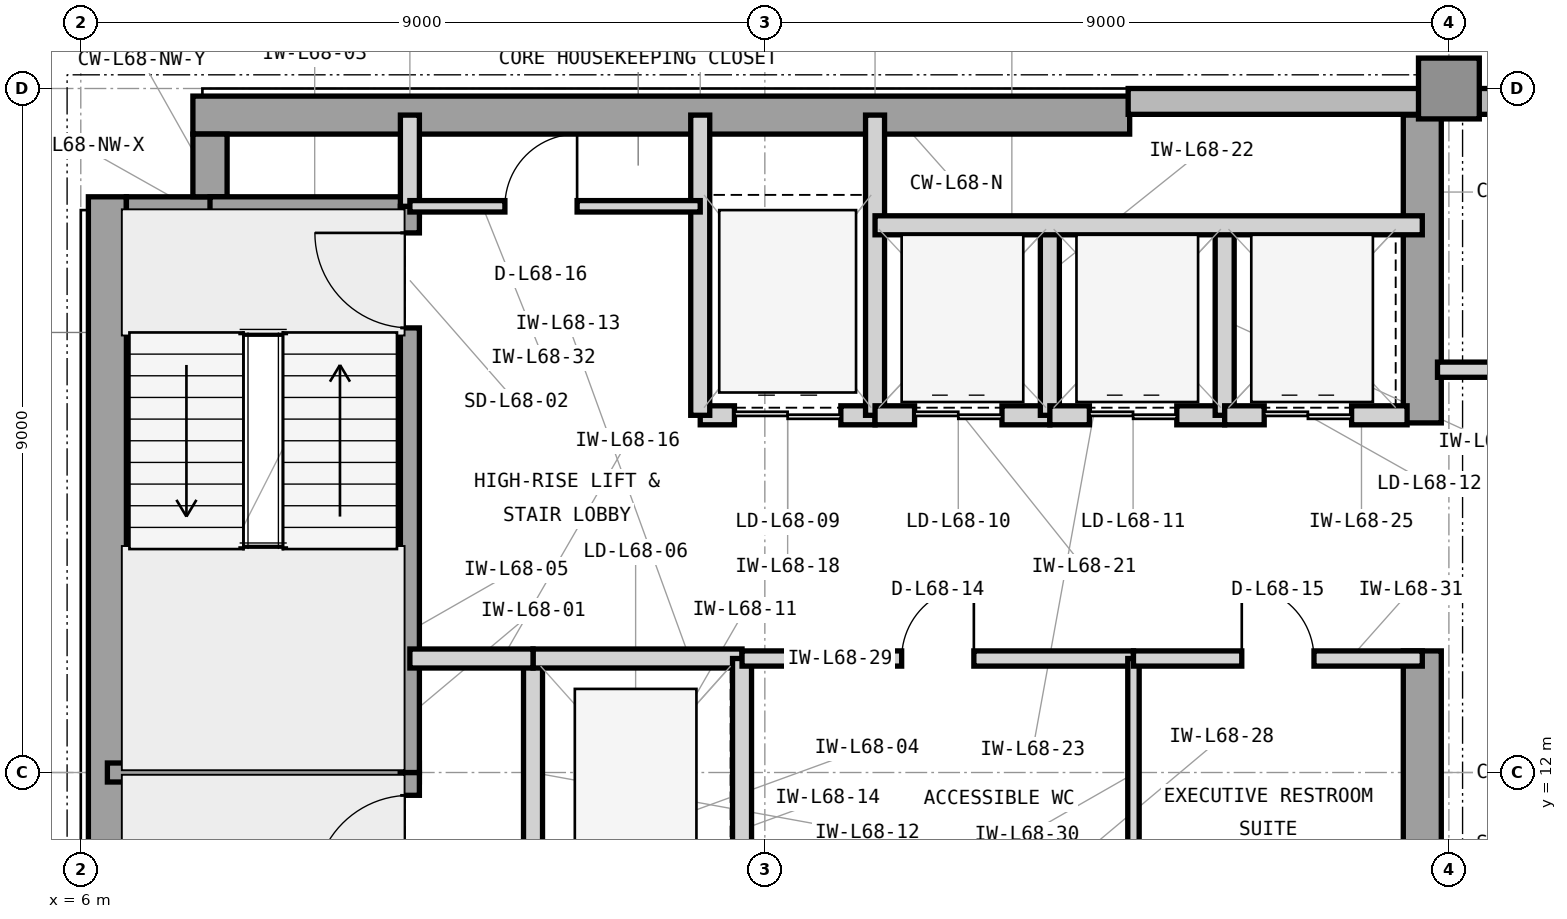
"""IFC4 building model, lengths in metres.
Left out: names, types, materials, properties, quantities, classifications, styles, units other than length and angle.
Written with IfcOpenShell. Run it as: python <this file> out.ifc"""

import sys

from ifc_helpers import new_model, si_unit, direction, frame, frame_2d, origin, origin_2d, place, context, subcontext, project, spatial, rectangle, extrude, element, fill, save


model = new_model("IFC4")
c1 = context("Model", 3, precision=1e-05, world=origin(), true_north=direction((0.0, 1.0)))
c2 = subcontext(c1, "Body", "Model", "MODEL_VIEW")
j1 = project(units=[si_unit("LENGTHUNIT", "METRE"), si_unit("PLANEANGLEUNIT", "RADIAN")], contexts=[c1])
p1 = place(None, origin())
s1 = spatial("IfcSite", under=j1, at=p1, CompositionType="ELEMENT")
p2 = place(p1, origin())
s2 = spatial("IfcBuilding", under=s1, at=p2, CompositionType="ELEMENT")
p3 = place(p2, frame((0.0, 0.0, 278.1)))
s3 = spatial("IfcBuildingStorey", under=s2, at=p3, CompositionType="ELEMENT", Elevation=278.1)
p4 = place(p3, frame((6.35, 4.425, 0.0), z_axis=(0.0, 0.0, 1.0), x_axis=(0.0, 1.0, 0.0)))
e1 = element("IfcWall", 1, at=p4, inside=s3, PredefinedType="SHEAR", context=c2, shape_type="SweptSolid", body=[
    extrude(rectangle(XDim=15.15, YDim=0.5, at=frame_2d((7.575, 0.0))), origin(), (0.0, 0.0, 1.0), 3.9),
])
p5 = place(p3, frame((7.475, 20.65, 0.0), z_axis=(0.0, 0.0, 1.0), x_axis=(1.0, 0.0, 0.0)))
e2 = element("IfcWall", 2, at=p5, inside=s3, PredefinedType="SHEAR", context=c2, shape_type="SweptSolid", body=[
    extrude(rectangle(XDim=12.325, YDim=0.5, at=frame_2d((6.163, 0.0))), origin(), (0.0, 0.0, 1.0), 3.9),
])
p6 = place(p3, frame((23.65, 10.4, 0.0), z_axis=(0.0, 0.0, 1.0), x_axis=(0.0, 1.0, 0.0)))
e3 = element("IfcWall", 3, at=p6, inside=s3, PredefinedType="SHEAR", context=c2, shape_type="SweptSolid", body=[
    extrude(rectangle(XDim=3.2, YDim=0.5, at=frame_2d((1.6, 0.0))), origin(), (0.0, 0.0, 1.0), 3.9),
])
p7 = place(p3, frame((23.65, 16.6, 0.0), z_axis=(0.0, 0.0, 1.0), x_axis=(0.0, 1.0, 0.0)))
e4 = element("IfcWall", 4, at=p7, inside=s3, PredefinedType="SHEAR", context=c2, shape_type="SweptSolid", body=[
    extrude(rectangle(XDim=4.05, YDim=0.5, at=frame_2d((2.025, 0.0))), origin(), (0.0, 0.0, 1.0), 3.9),
])
p8 = place(p3, frame((6.6, 19.35, 0.0), z_axis=(0.0, 0.0, 1.0), x_axis=(1.0, 0.0, 0.0)))
e5 = element("IfcWall", 5, at=p8, inside=s3, PredefinedType="SHEAR", context=c2, shape_type="SweptSolid", body=[
    extrude(rectangle(XDim=1.325, YDim=0.45, at=frame_2d((0.663, 0.0))), origin(), (0.0, 0.0, 1.0), 3.9),
])
p9 = place(p3, frame((7.7, 19.575, 0.0), z_axis=(0.0, 0.0, 1.0), x_axis=(0.0, 1.0, 0.0)))
e6 = element("IfcWall", 6, at=p9, inside=s3, PredefinedType="SHEAR", context=c2, shape_type="SweptSolid", body=[
    extrude(rectangle(XDim=0.825, YDim=0.45, at=frame_2d((0.413, 0.0))), origin(), (0.0, 0.0, 1.0), 3.9),
])
p10 = place(p3, frame((24.0, 21.0, 0.0), z_axis=(0.0, 0.0, 1.0), x_axis=(1.0, 0.0, 0.0)))
e7 = element("IfcColumn", 7, at=p10, inside=s3, PredefinedType="COLUMN", context=c2, shape_type="SweptSolid", body=[
    extrude(rectangle(XDim=0.8, YDim=0.8, at=origin_2d()), origin(), (0.0, 0.0, 1.0), 3.9),
])
p11 = place(p3, frame((52.4, 20.83, 0.0), z_axis=(0.0, 0.0, 1.0), x_axis=(-1.0, 0.0, 0.0)))
e8 = element("IfcWall", 8, at=p11, inside=s3, PredefinedType="STANDARD", context=c2, shape_type="SweptSolid", body=[
    extrude(rectangle(XDim=32.62, YDim=0.34, at=frame_2d((16.31, 0.0))), origin(), (0.0, 0.0, 1.0), 3.715),
])
p12 = place(p11, frame((15.01, 0.0, 0.8)))
e9 = element("IfcOpeningElement", 9, at=p12, cuts=e8, PredefinedType="OPENING", context=c2, shape_type="SweptSolid", body=[
    extrude(rectangle(XDim=2.6, YDim=2.35, at=frame_2d((1.3, 1.175))), frame((0.0, 0.18, 0.0), z_axis=(0.0, -1.0, 0.0), x_axis=(1.0, 0.0, 0.0)), (0.0, 0.0, 1.0), 0.36),
])
p13 = place(p11, frame((24.33, 0.0, 0.8)))
e10 = element("IfcOpeningElement", 10, at=p13, cuts=e8, PredefinedType="OPENING", context=c2, shape_type="SweptSolid", body=[
    extrude(rectangle(XDim=2.6, YDim=2.35, at=frame_2d((1.3, 1.175))), frame((0.0, 0.18, 0.0), z_axis=(0.0, -1.0, 0.0), x_axis=(1.0, 0.0, 0.0)), (0.0, 0.0, 1.0), 0.36),
])
p14 = place(p11, frame((7.525, 0.0, 0.8)))
e11 = element("IfcOpeningElement", 11, at=p14, cuts=e8, PredefinedType="OPENING", context=c2, shape_type="SweptSolid", body=[
    extrude(rectangle(XDim=1.9, YDim=2.35, at=frame_2d((0.95, 1.175))), frame((0.0, 0.18, 0.0), z_axis=(0.0, -1.0, 0.0), x_axis=(1.0, 0.0, 0.0)), (0.0, 0.0, 1.0), 0.36),
])
p15 = place(p3, frame((6.35, 12.0, 0.0), z_axis=(0.0, 0.0, 1.0), x_axis=(1.0, 0.0, 0.0)))
e12 = element("IfcWall", 12, at=p15, inside=s3, PredefinedType="SHEAR", context=c2, shape_type="SweptSolid", body=[
    extrude(rectangle(XDim=4.105, YDim=0.25, at=frame_2d((2.052, 0.0))), origin(), (0.0, 0.0, 1.0), 3.9),
])
p16 = place(p3, frame((7.7, 19.45, 0.0), z_axis=(0.0, 0.0, 1.0), x_axis=(1.0, 0.0, 0.0)))
e13 = element("IfcWall", 13, at=p16, inside=s3, PredefinedType="SHEAR", context=c2, shape_type="SweptSolid", body=[
    extrude(rectangle(XDim=2.755, YDim=0.25, at=frame_2d((1.377, 0.0))), origin(), (0.0, 0.0, 1.0), 3.9),
])
p17 = place(p3, frame((10.33, 4.55, 0.0), z_axis=(0.0, 0.0, 1.0), x_axis=(0.0, 1.0, 0.0)))
e14 = element("IfcWall", 14, at=p17, inside=s3, PredefinedType="SHEAR", context=c2, shape_type="SweptSolid", body=[
    extrude(rectangle(XDim=7.45, YDim=0.25, at=frame_2d((3.725, 0.0))), origin(), (0.0, 0.0, 1.0), 3.9),
])
p18 = place(p17, frame((5.9, 0.0, 0.0)))
e15 = element("IfcOpeningElement", 15, at=p18, cuts=e14, PredefinedType="OPENING", context=c2, shape_type="SweptSolid", body=[
    extrude(rectangle(XDim=1.25, YDim=2.2, at=frame_2d((0.625, 1.1))), frame((0.0, 0.135, 0.0), z_axis=(0.0, -1.0, 0.0), x_axis=(1.0, 0.0, 0.0)), (0.0, 0.0, 1.0), 0.27),
])
p19 = place(p3, frame((10.33, 12.0, 0.0), z_axis=(0.0, 0.0, 1.0), x_axis=(0.0, 1.0, 0.0)))
e16 = element("IfcWall", 16, at=p19, inside=s3, PredefinedType="SHEAR", context=c2, shape_type="SweptSolid", body=[
    extrude(rectangle(XDim=7.45, YDim=0.25, at=frame_2d((3.725, 0.0))), origin(), (0.0, 0.0, 1.0), 3.9),
])
p20 = place(p19, frame((5.85, 0.0, 0.0)))
e17 = element("IfcOpeningElement", 17, at=p20, cuts=e16, PredefinedType="OPENING", context=c2, shape_type="SweptSolid", body=[
    extrude(rectangle(XDim=1.25, YDim=2.2, at=frame_2d((0.625, 1.1))), frame((0.0, 0.135, 0.0), z_axis=(0.0, -1.0, 0.0), x_axis=(1.0, 0.0, 0.0)), (0.0, 0.0, 1.0), 0.27),
])
p21 = place(p3, frame((10.33, 19.45, 0.0), z_axis=(0.0, 0.0, 1.0), x_axis=(0.0, 1.0, 0.0)))
e18 = element("IfcWall", 18, at=p21, inside=s3, PredefinedType="PARTITIONING", context=c2, shape_type="SweptSolid", body=[
    extrude(rectangle(XDim=1.2, YDim=0.25, at=frame_2d((0.6, 0.0))), origin(), (0.0, 0.0, 1.0), 3.705),
])
p22 = place(p3, frame((11.95, 10.5, 0.0), z_axis=(0.0, 0.0, 1.0), x_axis=(0.0, 1.0, 0.0)))
e19 = element("IfcWall", 19, at=p22, inside=s3, PredefinedType="PARTITIONING", context=c2, shape_type="SweptSolid", body=[
    extrude(rectangle(XDim=3.0, YDim=0.25, at=frame_2d((1.5, 0.0))), origin(), (0.0, 0.0, 1.0), 3.705),
])
p23 = place(p3, frame((11.95, 13.5, 0.0), z_axis=(0.0, 0.0, 1.0), x_axis=(1.0, 0.0, 0.0)))
e20 = element("IfcWall", 20, at=p23, inside=s3, PredefinedType="PARTITIONING", context=c2, shape_type="SweptSolid", body=[
    extrude(rectangle(XDim=2.75, YDim=0.25, at=frame_2d((1.375, 0.0))), origin(), (0.0, 0.0, 1.0), 3.088),
])
p24 = place(p3, frame((14.7, 10.5, 0.0), z_axis=(0.0, 0.0, 1.0), x_axis=(0.0, 1.0, 0.0)))
e21 = element("IfcWall", 21, at=p24, inside=s3, PredefinedType="PARTITIONING", context=c2, shape_type="SweptSolid", body=[
    extrude(rectangle(XDim=3.0, YDim=0.25, at=frame_2d((1.5, 0.0))), origin(), (0.0, 0.0, 1.0), 3.705),
])
p25 = place(p3, frame((10.33, 13.5, 0.0), z_axis=(0.0, 0.0, 1.0), x_axis=(1.0, 0.0, 0.0)))
e22 = element("IfcWall", 22, at=p25, inside=s3, PredefinedType="PARTITIONING", context=c2, shape_type="SweptSolid", body=[
    extrude(rectangle(XDim=1.62, YDim=0.25, at=frame_2d((0.81, 0.0))), origin(), (0.0, 0.0, 1.0), 3.088),
])
p26 = place(p3, frame((14.15, 16.7, 0.0), z_axis=(0.0, 0.0, 1.0), x_axis=(1.0, 0.0, 0.0)))
e23 = element("IfcWall", 23, at=p26, inside=s3, PredefinedType="PARTITIONING", context=c2, shape_type="SweptSolid", body=[
    extrude(rectangle(XDim=2.3, YDim=0.25, at=frame_2d((1.15, 0.0))), origin(), (0.0, 0.0, 1.0), 3.088),
])
p27 = place(p26, frame((0.45, 0.0, 0.0)))
e24 = element("IfcOpeningElement", 24, at=p27, cuts=e23, PredefinedType="OPENING", context=c2, shape_type="SweptSolid", body=[
    extrude(rectangle(XDim=1.4, YDim=2.35, at=frame_2d((0.7, 1.175))), frame((0.0, 0.135, 0.0), z_axis=(0.0, -1.0, 0.0), x_axis=(1.0, 0.0, 0.0)), (0.0, 0.0, 1.0), 0.27),
])
for number, where, z_axis, x_axis in (
    (25, (14.15, 16.7, 0.0), (0.0, 0.0, 1.0), (0.0, 1.0, 0.0)),
    (26, (16.45, 16.7, 0.0), (0.0, 0.0, 1.0), (0.0, 1.0, 0.0)),
):
    element("IfcWall", number, at=place(p3, frame(where, z_axis=z_axis, x_axis=x_axis)), inside=s3, PredefinedType="PARTITIONING", context=c2, shape_type="SweptSolid", body=[
        extrude(rectangle(XDim=3.95, YDim=0.25, at=frame_2d((1.975, 0.0))), origin(), (0.0, 0.0, 1.0), 3.705),
    ])
p28 = place(p3, frame((16.45, 16.7, 0.0), z_axis=(0.0, 0.0, 1.0), x_axis=(1.0, 0.0, 0.0)))
e27 = element("IfcWall", 27, at=p28, inside=s3, PredefinedType="PARTITIONING", context=c2, shape_type="SweptSolid", body=[
    extrude(rectangle(XDim=2.3, YDim=0.25, at=frame_2d((1.15, 0.0))), origin(), (0.0, 0.0, 1.0), 3.088),
])
p29 = place(p28, frame((0.52, 0.0, 0.0)))
e28 = element("IfcOpeningElement", 28, at=p29, cuts=e27, PredefinedType="OPENING", context=c2, shape_type="SweptSolid", body=[
    extrude(rectangle(XDim=1.15, YDim=2.25, at=frame_2d((0.575, 1.125))), frame((0.0, 0.135, 0.0), z_axis=(0.0, -1.0, 0.0), x_axis=(1.0, 0.0, 0.0)), (0.0, 0.0, 1.0), 0.27),
])
p30 = place(p3, frame((18.75, 16.7, 0.0), z_axis=(0.0, 0.0, 1.0), x_axis=(0.0, 1.0, 0.0)))
e29 = element("IfcWall", 29, at=p30, inside=s3, PredefinedType="PARTITIONING", context=c2, shape_type="SweptSolid", body=[
    extrude(rectangle(XDim=2.5, YDim=0.25, at=frame_2d((1.25, 0.0))), origin(), (0.0, 0.0, 1.0), 3.705),
])
p31 = place(p3, frame((18.75, 16.7, 0.0), z_axis=(0.0, 0.0, 1.0), x_axis=(1.0, 0.0, 0.0)))
e30 = element("IfcWall", 30, at=p31, inside=s3, PredefinedType="PARTITIONING", context=c2, shape_type="SweptSolid", body=[
    extrude(rectangle(XDim=2.3, YDim=0.25, at=frame_2d((1.15, 0.0))), origin(), (0.0, 0.0, 1.0), 3.088),
])
p32 = place(p31, frame((0.52, 0.0, 0.0)))
e31 = element("IfcOpeningElement", 31, at=p32, cuts=e30, PredefinedType="OPENING", context=c2, shape_type="SweptSolid", body=[
    extrude(rectangle(XDim=1.15, YDim=2.25, at=frame_2d((0.575, 1.125))), frame((0.0, 0.135, 0.0), z_axis=(0.0, -1.0, 0.0), x_axis=(1.0, 0.0, 0.0)), (0.0, 0.0, 1.0), 0.27),
])
p33 = place(p3, frame((21.05, 16.7, 0.0), z_axis=(0.0, 0.0, 1.0), x_axis=(0.0, 1.0, 0.0)))
e32 = element("IfcWall", 32, at=p33, inside=s3, PredefinedType="PARTITIONING", context=c2, shape_type="SweptSolid", body=[
    extrude(rectangle(XDim=2.5, YDim=0.25, at=frame_2d((1.25, 0.0))), origin(), (0.0, 0.0, 1.0), 3.705),
])
p34 = place(p3, frame((21.05, 16.7, 0.0), z_axis=(0.0, 0.0, 1.0), x_axis=(1.0, 0.0, 0.0)))
e33 = element("IfcWall", 33, at=p34, inside=s3, PredefinedType="PARTITIONING", context=c2, shape_type="SweptSolid", body=[
    extrude(rectangle(XDim=2.4, YDim=0.25, at=frame_2d((1.2, 0.0))), origin(), (0.0, 0.0, 1.0), 3.088),
])
p35 = place(p34, frame((0.52, 0.0, 0.0)))
e34 = element("IfcOpeningElement", 34, at=p35, cuts=e33, PredefinedType="OPENING", context=c2, shape_type="SweptSolid", body=[
    extrude(rectangle(XDim=1.15, YDim=2.25, at=frame_2d((0.575, 1.125))), frame((0.0, 0.135, 0.0), z_axis=(0.0, -1.0, 0.0), x_axis=(1.0, 0.0, 0.0)), (0.0, 0.0, 1.0), 0.27),
])
p36 = place(p3, frame((16.45, 19.2, 0.0), z_axis=(0.0, 0.0, 1.0), x_axis=(1.0, 0.0, 0.0)))
e35 = element("IfcWall", 35, at=p36, inside=s3, PredefinedType="PARTITIONING", context=c2, shape_type="SweptSolid", body=[
    extrude(rectangle(XDim=7.2, YDim=0.25, at=frame_2d((3.6, 0.0))), origin(), (0.0, 0.0, 1.0), 3.705),
])
p37 = place(p3, frame((14.7, 13.5, 0.0), z_axis=(0.0, 0.0, 1.0), x_axis=(1.0, 0.0, 0.0)))
e36 = element("IfcWall", 36, at=p37, inside=s3, PredefinedType="PARTITIONING", context=c2, shape_type="SweptSolid", body=[
    extrude(rectangle(XDim=5.15, YDim=0.2, at=frame_2d((2.575, 0.0))), origin(), (0.0, 0.0, 1.0), 3.088),
])
p38 = place(p37, frame((2.1, 0.0, 0.0)))
e37 = element("IfcOpeningElement", 37, at=p38, cuts=e36, PredefinedType="OPENING", context=c2, shape_type="SweptSolid", body=[
    extrude(rectangle(XDim=0.95, YDim=2.1, at=frame_2d((0.475, 1.05))), frame((0.0, 0.11, 0.0), z_axis=(0.0, -1.0, 0.0), x_axis=(1.0, 0.0, 0.0)), (0.0, 0.0, 1.0), 0.22),
])
p39 = place(p3, frame((19.85, 10.465, 0.0), z_axis=(0.0, 0.0, 1.0), x_axis=(0.0, 1.0, 0.0)))
e38 = element("IfcWall", 38, at=p39, inside=s3, PredefinedType="PARTITIONING", context=c2, shape_type="SweptSolid", body=[
    extrude(rectangle(XDim=3.035, YDim=0.15, at=frame_2d((1.518, 0.0))), origin(), (0.0, 0.0, 1.0), 3.705),
])
p40 = place(p3, frame((19.85, 13.5, 0.0), z_axis=(0.0, 0.0, 1.0), x_axis=(1.0, 0.0, 0.0)))
e39 = element("IfcWall", 39, at=p40, inside=s3, PredefinedType="PARTITIONING", context=c2, shape_type="SweptSolid", body=[
    extrude(rectangle(XDim=3.8, YDim=0.2, at=frame_2d((1.9, 0.0))), origin(), (0.0, 0.0, 1.0), 3.088),
])
p41 = place(p40, frame((1.425, 0.0, 0.0)))
e40 = element("IfcOpeningElement", 40, at=p41, cuts=e39, PredefinedType="OPENING", context=c2, shape_type="SweptSolid", body=[
    extrude(rectangle(XDim=0.95, YDim=2.1, at=frame_2d((0.475, 1.05))), frame((0.0, 0.11, 0.0), z_axis=(0.0, -1.0, 0.0), x_axis=(1.0, 0.0, 0.0)), (0.0, 0.0, 1.0), 0.22),
])
p42 = place(p3, frame((10.33, 19.45, 0.0), z_axis=(0.0, 0.0, 1.0), x_axis=(1.0, 0.0, 0.0)))
e41 = element("IfcWall", 41, at=p42, inside=s3, PredefinedType="PARTITIONING", context=c2, shape_type="SweptSolid", body=[
    extrude(rectangle(XDim=3.82, YDim=0.15, at=frame_2d((1.91, 0.0))), origin(), (0.0, 0.0, 1.0), 3.705),
])
p43 = place(p42, frame((1.25, 0.0, 0.0)))
e42 = element("IfcOpeningElement", 42, at=p43, cuts=e41, PredefinedType="OPENING", context=c2, shape_type="SweptSolid", body=[
    extrude(rectangle(XDim=0.95, YDim=2.1, at=frame_2d((0.475, 1.05))), frame((0.0, 0.085, 0.0), z_axis=(0.0, -1.0, 0.0), x_axis=(1.0, 0.0, 0.0)), (0.0, 0.0, 1.0), 0.17),
])
p44 = place(p3, frame((23.85, 17.3, 0.0), z_axis=(0.0, 0.0, 1.0), x_axis=(1.0, 0.0, 0.0)))
e43 = element("IfcWall", 43, at=p44, inside=s3, PredefinedType="PARTITIONING", context=c2, shape_type="SweptSolid", body=[
    extrude(rectangle(XDim=7.35, YDim=0.2, at=frame_2d((3.675, 0.0))), origin(), (0.0, 0.0, 1.0), 3.705),
])
p45 = place(p44, frame((2.8, 0.0, 0.0)))
e44 = element("IfcOpeningElement", 44, at=p45, cuts=e43, PredefinedType="OPENING", context=c2, shape_type="SweptSolid", body=[
    extrude(rectangle(XDim=1.0, YDim=2.15, at=frame_2d((0.5, 1.075))), frame((0.0, 0.11, 0.0), z_axis=(0.0, -1.0, 0.0), x_axis=(1.0, 0.0, 0.0)), (0.0, 0.0, 1.0), 0.22),
])
p46 = place(p18, origin())
e45 = element("IfcDoor", 45, at=p46, inside=s3, OperationType="SINGLE_SWING_LEFT", PredefinedType="DOOR", context=c2, shape_type="SweptSolid", body=[
    extrude(rectangle(XDim=1.25, YDim=2.2, at=frame_2d((0.625, 1.1))), frame((0.0, 0.025, 0.0), z_axis=(0.0, -1.0, 0.0), x_axis=(1.0, 0.0, 0.0)), (0.0, 0.0, 1.0), 0.05),
])
fill(e15, e45)
p47 = place(p20, origin())
e46 = element("IfcDoor", 46, at=p47, inside=s3, OperationType="SINGLE_SWING_RIGHT", PredefinedType="DOOR", context=c2, shape_type="SweptSolid", body=[
    extrude(rectangle(XDim=1.25, YDim=2.2, at=frame_2d((0.625, 1.1))), frame((0.0, 0.025, 0.0), z_axis=(0.0, -1.0, 0.0), x_axis=(1.0, 0.0, 0.0)), (0.0, 0.0, 1.0), 0.05),
])
fill(e17, e46)
p48 = place(p27, origin())
e47 = element("IfcDoor", 47, at=p48, inside=s3, OperationType="DOUBLE_DOOR_SLIDING", PredefinedType="DOOR", context=c2, shape_type="SweptSolid", body=[
    extrude(rectangle(XDim=1.4, YDim=2.35, at=frame_2d((0.7, 1.175))), frame((0.0, 0.025, 0.0), z_axis=(0.0, -1.0, 0.0), x_axis=(1.0, 0.0, 0.0)), (0.0, 0.0, 1.0), 0.05),
])
fill(e24, e47)
p49 = place(p29, origin())
e48 = element("IfcDoor", 48, at=p49, inside=s3, OperationType="DOUBLE_DOOR_SLIDING", PredefinedType="DOOR", context=c2, shape_type="SweptSolid", body=[
    extrude(rectangle(XDim=1.15, YDim=2.25, at=frame_2d((0.575, 1.125))), frame((0.0, 0.025, 0.0), z_axis=(0.0, -1.0, 0.0), x_axis=(1.0, 0.0, 0.0)), (0.0, 0.0, 1.0), 0.05),
])
fill(e28, e48)
p50 = place(p32, origin())
e49 = element("IfcDoor", 49, at=p50, inside=s3, OperationType="DOUBLE_DOOR_SLIDING", PredefinedType="DOOR", context=c2, shape_type="SweptSolid", body=[
    extrude(rectangle(XDim=1.15, YDim=2.25, at=frame_2d((0.575, 1.125))), frame((0.0, 0.025, 0.0), z_axis=(0.0, -1.0, 0.0), x_axis=(1.0, 0.0, 0.0)), (0.0, 0.0, 1.0), 0.05),
])
fill(e31, e49)
p51 = place(p35, origin())
e50 = element("IfcDoor", 50, at=p51, inside=s3, OperationType="DOUBLE_DOOR_SLIDING", PredefinedType="DOOR", context=c2, shape_type="SweptSolid", body=[
    extrude(rectangle(XDim=1.15, YDim=2.25, at=frame_2d((0.575, 1.125))), frame((0.0, 0.025, 0.0), z_axis=(0.0, -1.0, 0.0), x_axis=(1.0, 0.0, 0.0)), (0.0, 0.0, 1.0), 0.05),
])
fill(e34, e50)
p52 = place(p38, origin())
e51 = element("IfcDoor", 51, at=p52, inside=s3, OperationType="SINGLE_SWING_RIGHT", PredefinedType="DOOR", context=c2, shape_type="SweptSolid", body=[
    extrude(rectangle(XDim=0.95, YDim=2.1, at=frame_2d((0.475, 1.05))), frame((0.0, 0.025, 0.0), z_axis=(0.0, -1.0, 0.0), x_axis=(1.0, 0.0, 0.0)), (0.0, 0.0, 1.0), 0.05),
])
fill(e37, e51)
p53 = place(p41, origin())
e52 = element("IfcDoor", 52, at=p53, inside=s3, OperationType="SINGLE_SWING_LEFT", PredefinedType="DOOR", context=c2, shape_type="SweptSolid", body=[
    extrude(rectangle(XDim=0.95, YDim=2.1, at=frame_2d((0.475, 1.05))), frame((0.0, 0.025, 0.0), z_axis=(0.0, -1.0, 0.0), x_axis=(1.0, 0.0, 0.0)), (0.0, 0.0, 1.0), 0.05),
])
fill(e40, e52)
p54 = place(p43, origin())
e53 = element("IfcDoor", 53, at=p54, inside=s3, OperationType="SINGLE_SWING_RIGHT", PredefinedType="DOOR", context=c2, shape_type="SweptSolid", body=[
    extrude(rectangle(XDim=0.95, YDim=2.1, at=frame_2d((0.475, 1.05))), frame((0.0, 0.025, 0.0), z_axis=(0.0, -1.0, 0.0), x_axis=(1.0, 0.0, 0.0)), (0.0, 0.0, 1.0), 0.05),
])
fill(e42, e53)
save(model, sys.argv[1])
